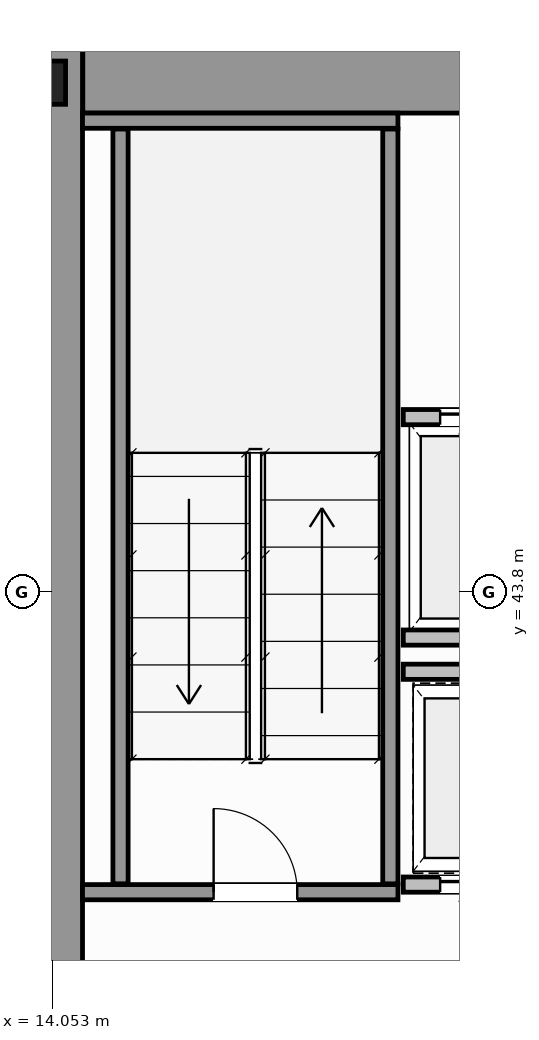
"""IFC4 building model, lengths in metres.
Left out: names, types, materials, properties, quantities, classifications, styles, units other than length and angle.
Written with IfcOpenShell. Run it as: python <this file> out.ifc"""

import sys

from ifc_helpers import new_model, si_unit, direction, frame, frame_2d, origin, origin_2d, place, context, subcontext, project, spatial, rectangle, i_section, extrude, source, transform, mapped, element, fill, save


model = new_model("IFC4")
c1 = context("Model", 3, precision=1e-05, world=origin(), true_north=direction((0.0, 1.0)))
c2 = subcontext(c1, "Body", "Model", "MODEL_VIEW")
j1 = project(units=[si_unit("LENGTHUNIT", "METRE"), si_unit("PLANEANGLEUNIT", "RADIAN")], contexts=[c1])
p1 = place(None, origin())
s1 = spatial("IfcSite", under=j1, at=p1, CompositionType="ELEMENT")
p2 = place(p1, origin())
s2 = spatial("IfcBuilding", under=s1, at=p2, CompositionType="ELEMENT")
p3 = place(p2, frame((0.0, 0.0, 14.4)))
s3 = spatial("IfcBuildingStorey", under=s2, at=p3, CompositionType="ELEMENT", Elevation=14.4)
m1 = source(origin(), c2, "Body", "SweptSolid", [
    extrude(i_section(OverallWidth=0.454, OverallDepth=0.569, WebThickness=0.078, FlangeThickness=0.08, FilletRadius=0.015, at=origin_2d()), origin(), (0.0, 0.0, 1.0), 4.4),
])
p4 = place(p3, frame((14.0, 50.5, 0.0), z_axis=(0.0, 0.0, 1.0), x_axis=(1.0, 0.0, 0.0)))
e1 = element("IfcColumn", 1, at=p4, inside=s3, PredefinedType="COLUMN", context=c2, shape_type="MappedRepresentation", body=[
    mapped(m1, transform((0.0, 0.0, 0.0), scale=1.0)),
])
p5 = place(p3, frame((14.454, 50.55, 0.0), z_axis=(0.0, 0.0, 1.0), x_axis=(1.0, 0.0, 0.0)))
e2 = element("IfcWall", 2, at=p5, inside=s3, PredefinedType="SHEAR", context=c2, shape_type="SweptSolid", body=[
    extrude(rectangle(XDim=19.544, YDim=0.9, at=frame_2d((9.772, 0.0))), origin(), (0.0, 0.0, 1.0), 4.4),
])
p6 = place(p3, frame((14.0, 36.5, 0.0), z_axis=(0.0, 0.0, 1.0), x_axis=(0.0, 1.0, 0.0)))
e3 = element("IfcWall", 3, at=p6, inside=s3, PredefinedType="SHEAR", context=c2, shape_type="SweptSolid", body=[
    extrude(rectangle(XDim=14.5, YDim=0.9, at=frame_2d((7.25, 0.0))), origin(), (0.0, 0.0, 1.0), 4.4),
])
p7 = place(p3, frame((14.45, 39.85, 0.0), z_axis=(0.0, 0.0, 1.0), x_axis=(1.0, 0.0, 0.0)))
e4 = element("IfcWall", 4, at=p7, inside=s3, PredefinedType="SOLIDWALL", context=c2, shape_type="SweptSolid", body=[
    extrude(rectangle(XDim=4.15, YDim=0.2, at=frame_2d((2.075, 0.0))), origin(), (0.0, 0.0, 1.0), 4.4),
])
p8 = place(p7, frame((1.725, 0.0, 0.0)))
e5 = element("IfcOpeningElement", 5, at=p8, cuts=e4, PredefinedType="OPENING", context=c2, shape_type="SweptSolid", body=[
    extrude(rectangle(XDim=1.1, YDim=2.15, at=frame_2d((0.55, 1.075))), frame((0.0, 0.11, 0.0), z_axis=(0.0, -1.0, 0.0), x_axis=(1.0, 0.0, 0.0)), (0.0, 0.0, 1.0), 0.22),
])
p9 = place(p3, frame((14.45, 50.0, 0.0), z_axis=(0.0, 0.0, 1.0), x_axis=(1.0, 0.0, 0.0)))
e6 = element("IfcWall", 6, at=p9, inside=s3, PredefinedType="SOLIDWALL", context=c2, shape_type="SweptSolid", body=[
    extrude(rectangle(XDim=4.15, YDim=0.2, at=frame_2d((2.075, 0.0))), origin(), (0.0, 0.0, 1.0), 4.4),
])
for number, where, z_axis, x_axis in (
    (7, (14.95, 39.96, 0.0), (0.0, 0.0, 1.0), (0.0, 1.0, 0.0)),
    (8, (18.5, 39.96, 0.0), (0.0, 0.0, 1.0), (0.0, 1.0, 0.0)),
):
    element("IfcWall", number, at=place(p3, frame(where, z_axis=z_axis, x_axis=x_axis)), inside=s3, PredefinedType="SOLIDWALL", context=c2, shape_type="SweptSolid", body=[
        extrude(rectangle(XDim=9.93, YDim=0.2, at=frame_2d((4.965, 0.0))), origin(), (0.0, 0.0, 1.0), 4.4),
    ])
p10 = place(p3, frame((18.67, 46.1, 0.0), z_axis=(0.0, 0.0, 1.0), x_axis=(1.0, 0.0, 0.0)))
e9 = element("IfcWall", 9, at=p10, inside=s3, PredefinedType="SOLIDWALL", context=c2, shape_type="SweptSolid", body=[
    extrude(rectangle(XDim=2.07, YDim=0.2, at=frame_2d((1.035, 0.0))), origin(), (0.0, 0.0, 1.0), 4.12),
])
p11 = place(p10, frame((0.485, 0.0, 0.0)))
e10 = element("IfcOpeningElement", 10, at=p11, cuts=e9, PredefinedType="OPENING", context=c2, shape_type="SweptSolid", body=[
    extrude(rectangle(XDim=1.1, YDim=2.15, at=frame_2d((0.55, 1.075))), frame((0.0, 0.11, 0.0), z_axis=(0.0, -1.0, 0.0), x_axis=(1.0, 0.0, 0.0)), (0.0, 0.0, 1.0), 0.22),
])
p12 = place(p3, frame((18.67, 43.2, 0.0), z_axis=(0.0, 0.0, 1.0), x_axis=(1.0, 0.0, 0.0)))
e11 = element("IfcWall", 11, at=p12, inside=s3, PredefinedType="SOLIDWALL", context=c2, shape_type="SweptSolid", body=[
    extrude(rectangle(XDim=2.07, YDim=0.2, at=frame_2d((1.035, 0.0))), origin(), (0.0, 0.0, 1.0), 4.12),
])
p13 = place(p3, frame((18.67, 39.95, 0.0), z_axis=(0.0, 0.0, 1.0), x_axis=(1.0, 0.0, 0.0)))
e12 = element("IfcWall", 12, at=p13, inside=s3, PredefinedType="SOLIDWALL", context=c2, shape_type="SweptSolid", body=[
    extrude(rectangle(XDim=2.07, YDim=0.2, at=frame_2d((1.035, 0.0))), origin(), (0.0, 0.0, 1.0), 4.12),
])
p14 = place(p13, frame((0.485, 0.0, 0.0)))
e13 = element("IfcOpeningElement", 13, at=p14, cuts=e12, PredefinedType="OPENING", context=c2, shape_type="SweptSolid", body=[
    extrude(rectangle(XDim=1.1, YDim=2.15, at=frame_2d((0.55, 1.075))), frame((0.0, 0.11, 0.0), z_axis=(0.0, -1.0, 0.0), x_axis=(1.0, 0.0, 0.0)), (0.0, 0.0, 1.0), 0.22),
])
p15 = place(p3, frame((18.67, 42.75, 0.0), z_axis=(0.0, 0.0, 1.0), x_axis=(1.0, 0.0, 0.0)))
e14 = element("IfcWall", 14, at=p15, inside=s3, PredefinedType="SOLIDWALL", context=c2, shape_type="SweptSolid", body=[
    extrude(rectangle(XDim=2.07, YDim=0.2, at=frame_2d((1.035, 0.0))), origin(), (0.0, 0.0, 1.0), 4.12),
])
m2 = source(origin(), c2, "Body", "SweptSolid", [
    extrude(rectangle(XDim=1.1, YDim=2.15, at=frame_2d((0.55, 1.075))), frame((0.0, 0.025, 0.0), z_axis=(0.0, -1.0, 0.0), x_axis=(1.0, 0.0, 0.0)), (0.0, 0.0, 1.0), 0.05),
])
p16 = place(p8, origin())
e15 = element("IfcDoor", 15, at=p16, inside=s3, OperationType="SINGLE_SWING_LEFT", PredefinedType="DOOR", context=c2, shape_type="MappedRepresentation", body=[
    mapped(m2, transform((0.0, 0.0, 0.0), scale=1.0)),
])
fill(e5, e15)
p17 = place(p11, origin())
e16 = element("IfcDoor", 16, at=p17, inside=s3, OperationType="DOUBLE_DOOR_SLIDING", PredefinedType="DOOR", context=c2, shape_type="MappedRepresentation", body=[
    mapped(m2, transform((0.0, 0.0, 0.0), scale=1.0)),
])
fill(e10, e16)
p18 = place(p14, origin())
e17 = element("IfcDoor", 17, at=p18, inside=s3, OperationType="DOUBLE_DOOR_SLIDING", PredefinedType="DOOR", context=c2, shape_type="MappedRepresentation", body=[
    mapped(m2, transform((0.0, 0.0, 0.0), scale=1.0)),
])
fill(e13, e17)
save(model, sys.argv[1])
